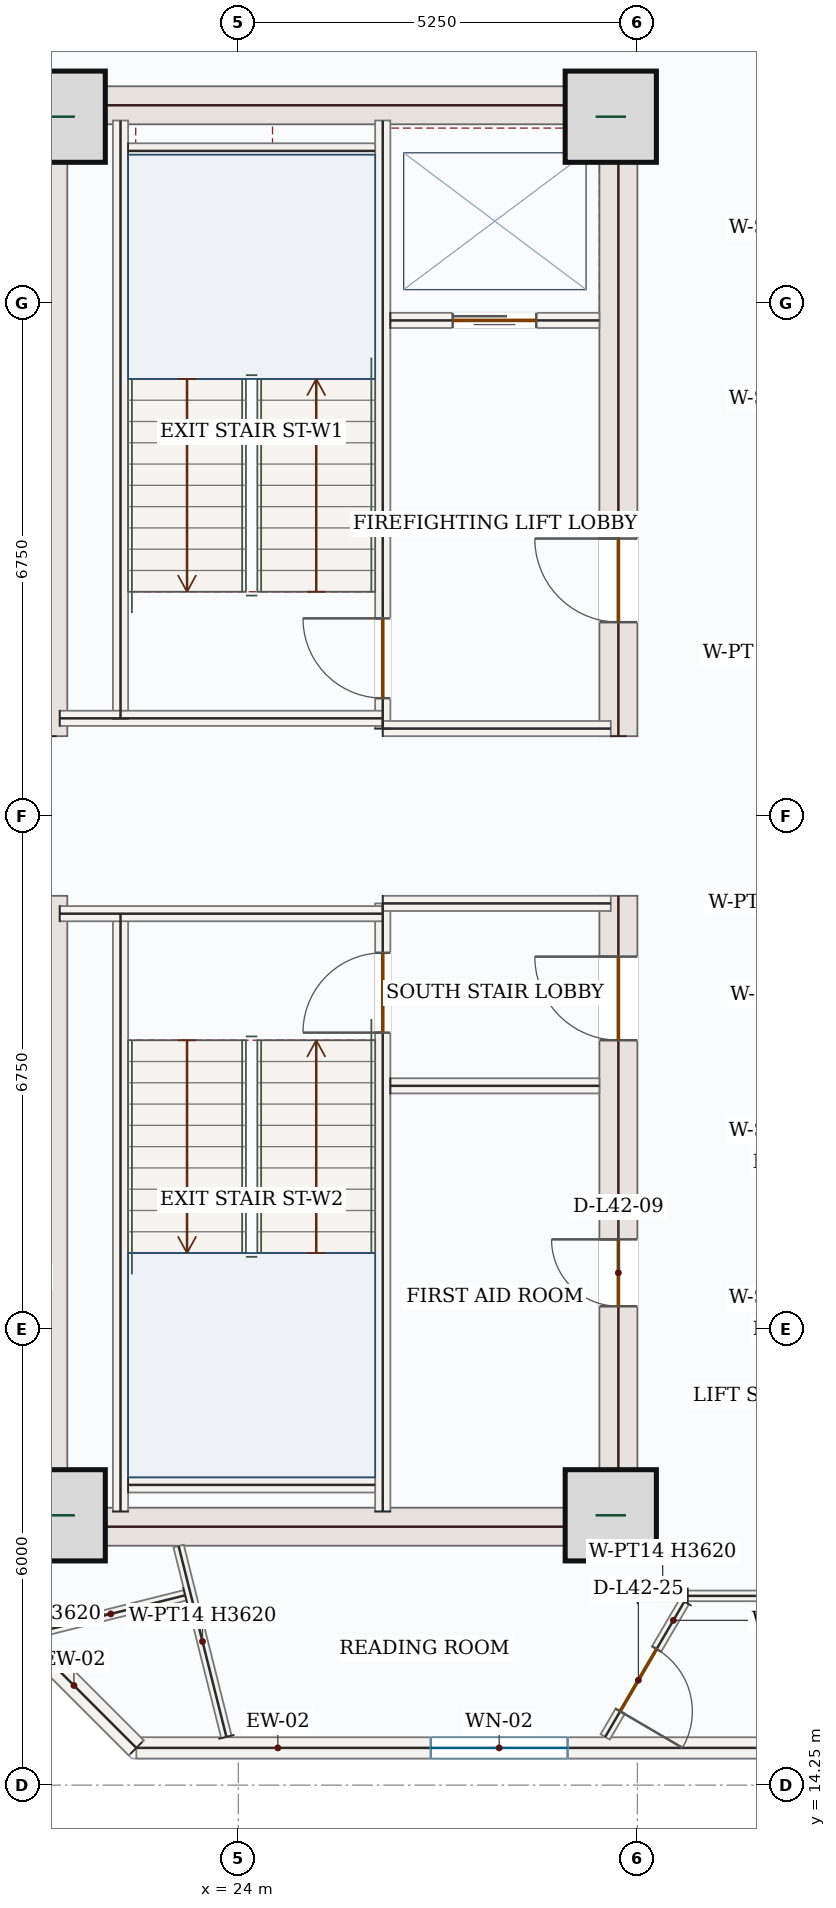
"""IFC4 building model, lengths in metres.
Left out: names, types, materials, properties, quantities, classifications, styles, units other than length and angle.
Written with IfcOpenShell. Run it as: python <this file> out.ifc"""

import sys

from ifc_helpers import new_model, si_unit, direction, frame, frame_2d, origin, origin_2d, place, context, subcontext, project, spatial, rectangle, extrude, source, transform, mapped, element, fill, save


model = new_model("IFC4")
c1 = context("Model", 3, precision=1e-05, world=origin(), true_north=direction((0.0, 1.0)))
c2 = subcontext(c1, "Body", "Model", "MODEL_VIEW")
j1 = project(units=[si_unit("LENGTHUNIT", "METRE"), si_unit("PLANEANGLEUNIT", "RADIAN")], contexts=[c1])
p1 = place(None, origin())
s1 = spatial("IfcSite", under=j1, at=p1, CompositionType="ELEMENT")
p2 = place(p1, origin())
s2 = spatial("IfcBuilding", under=s1, at=p2, CompositionType="ELEMENT")
p3 = place(p2, frame((0.0, 0.0, 182.4)))
s3 = spatial("IfcBuildingStorey", under=s2, at=p3, CompositionType="ELEMENT", Elevation=182.4)
m1 = source(origin(), c2, "Body", "SweptSolid", [
    extrude(rectangle(XDim=8.55, YDim=0.5, at=frame_2d((4.275, 0.0))), origin(), (0.0, 0.0, 1.0), 3.62),
])
for number, where, z_axis, x_axis in (
    (1, (21.5, 17.4, 0.0), (0.0, 0.0, 1.0), (0.0, 1.0, 0.0)),
    (2, (21.5, 28.05, 0.0), (0.0, 0.0, 1.0), (0.0, 1.0, 0.0)),
):
    element("IfcWall", number, at=place(p3, frame(where, z_axis=z_axis, x_axis=x_axis)), inside=s3, PredefinedType="SHEAR", context=c2, shape_type="MappedRepresentation", body=[
        mapped(m1, transform((0.0, 0.0, 0.0), x_axis=(1.0, 0.0, 0.0), y_axis=(0.0, 1.0, 0.0), z_axis=(0.0, 0.0, 1.0), scale=1.0)),
    ])
p4 = place(p3, frame((29.0, 17.4, 0.0), z_axis=(0.0, 0.0, 1.0), x_axis=(0.0, 1.0, 0.0)))
e3 = element("IfcWall", 3, at=p4, inside=s3, PredefinedType="SHEAR", context=c2, shape_type="SweptSolid", body=[
    extrude(rectangle(XDim=8.55, YDim=0.5, at=frame_2d((4.275, 0.0))), origin(), (0.0, 0.0, 1.0), 3.62),
])
p5 = place(p4, frame((6.65, 0.0, 0.0)))
e4 = element("IfcOpeningElement", 4, at=p5, cuts=e3, PredefinedType="OPENING", context=c2, shape_type="SweptSolid", body=[
    extrude(rectangle(XDim=1.1, YDim=2.2, at=frame_2d((0.55, 1.1))), frame((0.0, 0.26, 0.0), z_axis=(0.0, -1.0, 0.0), x_axis=(1.0, 0.0, 0.0)), (0.0, 0.0, 1.0), 0.52),
])
p6 = place(p4, frame((3.15, 0.0, 0.0)))
e5 = element("IfcOpeningElement", 5, at=p6, cuts=e3, PredefinedType="OPENING", context=c2, shape_type="SweptSolid", body=[
    extrude(rectangle(XDim=0.88, YDim=2.1, at=frame_2d((0.44, 1.05))), frame((0.0, 0.26, 0.0), z_axis=(0.0, -1.0, 0.0), x_axis=(1.0, 0.0, 0.0)), (0.0, 0.0, 1.0), 0.52),
])
p7 = place(p3, frame((29.0, 28.05, 0.0), z_axis=(0.0, 0.0, 1.0), x_axis=(0.0, 1.0, 0.0)))
e6 = element("IfcWall", 6, at=p7, inside=s3, PredefinedType="SHEAR", context=c2, shape_type="SweptSolid", body=[
    extrude(rectangle(XDim=8.55, YDim=0.5, at=frame_2d((4.275, 0.0))), origin(), (0.0, 0.0, 1.0), 3.62),
])
p8 = place(p7, frame((1.5, 0.0, 0.0)))
e7 = element("IfcOpeningElement", 7, at=p8, cuts=e6, PredefinedType="OPENING", context=c2, shape_type="SweptSolid", body=[
    extrude(rectangle(XDim=1.1, YDim=2.2, at=frame_2d((0.55, 1.1))), frame((0.0, 0.26, 0.0), z_axis=(0.0, -1.0, 0.0), x_axis=(1.0, 0.0, 0.0)), (0.0, 0.0, 1.0), 0.52),
])
m2 = source(origin(), c2, "Body", "SweptSolid", [
    extrude(rectangle(XDim=7.0, YDim=0.5, at=frame_2d((3.5, 0.0))), origin(), (0.0, 0.0, 1.0), 3.62),
])
for number, where, z_axis, x_axis in (
    (8, (21.75, 17.65, 0.0), (0.0, 0.0, 1.0), (1.0, 0.0, 0.0)),
    (9, (21.75, 36.35, 0.0), (0.0, 0.0, 1.0), (1.0, 0.0, 0.0)),
):
    element("IfcWall", number, at=place(p3, frame(where, z_axis=z_axis, x_axis=x_axis)), inside=s3, PredefinedType="SHEAR", context=c2, shape_type="MappedRepresentation", body=[
        mapped(m2, transform((0.0, 0.0, 0.0), x_axis=(1.0, 0.0, 0.0), y_axis=(0.0, 1.0, 0.0), z_axis=(0.0, 0.0, 1.0), scale=1.0)),
    ])
m3 = source(origin(), c2, "Body", "SweptSolid", [
    extrude(rectangle(XDim=1.2, YDim=1.2, at=origin_2d()), origin(), (0.0, 0.0, 1.0), 3.9),
])
for number, where, z_axis, x_axis in (
    (10, (21.65, 17.8, 0.0), (0.0, 0.0, 1.0), (1.0, 0.0, 0.0)),
    (11, (28.9, 17.8, 0.0), (0.0, 0.0, 1.0), (1.0, 0.0, 0.0)),
    (12, (21.65, 36.2, 0.0), (0.0, 0.0, 1.0), (1.0, 0.0, 0.0)),
    (13, (28.9, 36.2, 0.0), (0.0, 0.0, 1.0), (1.0, 0.0, 0.0)),
):
    element("IfcColumn", number, at=place(p3, frame(where, z_axis=z_axis, x_axis=x_axis)), inside=s3, PredefinedType="COLUMN", context=c2, shape_type="MappedRepresentation", body=[
        mapped(m3, transform((0.0, 0.0, 0.0), x_axis=(1.0, 0.0, 0.0), y_axis=(0.0, 1.0, 0.0), z_axis=(0.0, 0.0, 1.0), scale=1.0)),
    ])
p9 = place(p3, frame((32.205, 14.74, 0.0), z_axis=(0.0, 0.0, 1.0), x_axis=(-1.0, 0.0, 0.0)))
e14 = element("IfcWall", 14, at=p9, inside=s3, PredefinedType="SOLIDWALL", context=c2, shape_type="SweptSolid", body=[
    extrude(rectangle(XDim=9.547, YDim=0.28, at=frame_2d((4.773, 0.0))), origin(), (0.0, 0.0, 1.0), 3.62),
])
p10 = place(p9, frame((3.873, 0.0, 0.85)))
e15 = element("IfcOpeningElement", 15, at=p10, cuts=e14, PredefinedType="OPENING", context=c2, shape_type="SweptSolid", body=[
    extrude(rectangle(XDim=1.8, YDim=1.75, at=frame_2d((0.9, 0.875))), frame((0.0, 0.15, 0.0), z_axis=(0.0, -1.0, 0.0), x_axis=(1.0, 0.0, 0.0)), (0.0, 0.0, 1.0), 0.3),
])
m4 = source(origin(), c2, "Body", "SweptSolid", [
    extrude(rectangle(XDim=2.322, YDim=0.28, at=frame_2d((1.161, 0.0))), origin(), (0.0, 0.0, 1.0), 3.62),
])
p11 = place(p3, frame((22.658, 14.74, 0.0), z_axis=(0.0, 0.0, 1.0), x_axis=(-0.707106781187, 0.707106781187, 0.0)))
e16 = element("IfcWall", 16, at=p11, inside=s3, PredefinedType="SOLIDWALL", context=c2, shape_type="MappedRepresentation", body=[
    mapped(m4, transform((0.0, 0.0, 0.0), x_axis=(1.0, 0.0, 0.0), y_axis=(0.0, 1.0, 0.0), z_axis=(0.0, 0.0, 1.0), scale=1.0)),
])
m5 = source(origin(), c2, "Body", "SweptSolid", [
    extrude(rectangle(XDim=5.258, YDim=0.28, at=frame_2d((2.629, 0.0))), origin(), (0.0, 0.0, 1.0), 3.62),
])
p12 = place(p3, frame((18.94, 35.542, 0.0), z_axis=(0.0, 0.0, 1.0), x_axis=(0.707106781187, 0.707106781187, 0.0)))
e17 = element("IfcWall", 17, at=p12, inside=s3, PredefinedType="SOLIDWALL", context=c2, shape_type="MappedRepresentation", body=[
    mapped(m5, transform((0.0, 0.0, 0.0), x_axis=(1.0, 0.0, 0.0), y_axis=(0.0, 1.0, 0.0), z_axis=(0.0, 0.0, 1.0), scale=1.0)),
])
m6 = source(origin(), c2, "Body", "SweptSolid", [
    extrude(rectangle(XDim=7.87, YDim=0.2, at=frame_2d((3.935, 0.0))), origin(), (0.0, 0.0, 1.0), 3.62),
])
for number, where, z_axis, x_axis in (
    (18, (22.45, 17.85, 0.0), (0.0, 0.0, 1.0), (0.0, 1.0, 0.0)),
    (19, (22.45, 28.28, 0.0), (0.0, 0.0, 1.0), (0.0, 1.0, 0.0)),
):
    element("IfcWall", number, at=place(p3, frame(where, z_axis=z_axis, x_axis=x_axis)), inside=s3, PredefinedType="SOLIDWALL", context=c2, shape_type="MappedRepresentation", body=[
        mapped(m6, transform((0.0, 0.0, 0.0), x_axis=(1.0, 0.0, 0.0), y_axis=(0.0, 1.0, 0.0), z_axis=(0.0, 0.0, 1.0), scale=1.0)),
    ])
p13 = place(p3, frame((25.9, 17.85, 0.0), z_axis=(0.0, 0.0, 1.0), x_axis=(0.0, 1.0, 0.0)))
e20 = element("IfcWall", 20, at=p13, inside=s3, PredefinedType="SOLIDWALL", context=c2, shape_type="SweptSolid", body=[
    extrude(rectangle(XDim=8.0, YDim=0.2, at=frame_2d((4.0, 0.0))), origin(), (0.0, 0.0, 1.0), 3.62),
])
p14 = place(p13, frame((6.3, 0.0, 0.0)))
e21 = element("IfcOpeningElement", 21, at=p14, cuts=e20, PredefinedType="OPENING", context=c2, shape_type="SweptSolid", body=[
    extrude(rectangle(XDim=1.05, YDim=2.15, at=frame_2d((0.525, 1.075))), frame((0.0, 0.11, 0.0), z_axis=(0.0, -1.0, 0.0), x_axis=(1.0, 0.0, 0.0)), (0.0, 0.0, 1.0), 0.22),
])
p15 = place(p3, frame((25.9, 28.15, 0.0), z_axis=(0.0, 0.0, 1.0), x_axis=(0.0, 1.0, 0.0)))
e22 = element("IfcWall", 22, at=p15, inside=s3, PredefinedType="SOLIDWALL", context=c2, shape_type="SweptSolid", body=[
    extrude(rectangle(XDim=8.0, YDim=0.2, at=frame_2d((4.0, 0.0))), origin(), (0.0, 0.0, 1.0), 3.62),
])
p16 = place(p15, frame((0.4, 0.0, 0.0)))
e23 = element("IfcOpeningElement", 23, at=p16, cuts=e22, PredefinedType="OPENING", context=c2, shape_type="SweptSolid", body=[
    extrude(rectangle(XDim=1.05, YDim=2.15, at=frame_2d((0.525, 1.075))), frame((0.0, 0.11, 0.0), z_axis=(0.0, -1.0, 0.0), x_axis=(1.0, 0.0, 0.0)), (0.0, 0.0, 1.0), 0.22),
])
m7 = source(origin(), c2, "Body", "SweptSolid", [
    extrude(rectangle(XDim=4.25, YDim=0.2, at=frame_2d((2.125, 0.0))), origin(), (0.0, 0.0, 1.0), 3.62),
])
p17 = place(p3, frame((21.65, 25.715, 0.0), z_axis=(0.0, 0.0, 1.0), x_axis=(1.0, 0.0, 0.0)))
e24 = element("IfcWall", 24, at=p17, inside=s3, PredefinedType="SOLIDWALL", context=c2, shape_type="MappedRepresentation", body=[
    mapped(m7, transform((0.0, 0.0, 0.0), x_axis=(1.0, 0.0, 0.0), y_axis=(0.0, 1.0, 0.0), z_axis=(0.0, 0.0, 1.0), scale=1.0)),
])
m8 = source(origin(), c2, "Body", "SweptSolid", [
    extrude(rectangle(XDim=3.0, YDim=0.2, at=frame_2d((1.5, 0.0))), origin(), (0.0, 0.0, 1.0), 3.62),
])
p18 = place(p3, frame((25.9, 25.85, 0.0), z_axis=(0.0, 0.0, 1.0), x_axis=(1.0, 0.0, 0.0)))
e25 = element("IfcWall", 25, at=p18, inside=s3, PredefinedType="SOLIDWALL", context=c2, shape_type="MappedRepresentation", body=[
    mapped(m8, transform((0.0, 0.0, 0.0), x_axis=(1.0, 0.0, 0.0), y_axis=(0.0, 1.0, 0.0), z_axis=(0.0, 0.0, 1.0), scale=1.0)),
])
p19 = place(p3, frame((21.65, 28.285, 0.0), z_axis=(0.0, 0.0, 1.0), x_axis=(1.0, 0.0, 0.0)))
e26 = element("IfcWall", 26, at=p19, inside=s3, PredefinedType="SOLIDWALL", context=c2, shape_type="MappedRepresentation", body=[
    mapped(m7, transform((0.0, 0.0, 0.0), x_axis=(1.0, 0.0, 0.0), y_axis=(0.0, 1.0, 0.0), z_axis=(0.0, 0.0, 1.0), scale=1.0)),
])
p20 = place(p3, frame((25.9, 28.15, 0.0), z_axis=(0.0, 0.0, 1.0), x_axis=(1.0, 0.0, 0.0)))
e27 = element("IfcWall", 27, at=p20, inside=s3, PredefinedType="SOLIDWALL", context=c2, shape_type="MappedRepresentation", body=[
    mapped(m8, transform((0.0, 0.0, 0.0), x_axis=(1.0, 0.0, 0.0), y_axis=(0.0, 1.0, 0.0), z_axis=(0.0, 0.0, 1.0), scale=1.0)),
])
m9 = source(origin(), c2, "Body", "SweptSolid", [
    extrude(rectangle(XDim=3.25, YDim=0.2, at=frame_2d((1.625, 0.0))), origin(), (0.0, 0.0, 1.0), 3.62),
])
for number, where, z_axis, x_axis in (
    (28, (22.55, 35.75, 0.0), (0.0, 0.0, 1.0), (1.0, 0.0, 0.0)),
    (29, (22.55, 18.2, 0.0), (0.0, 0.0, 1.0), (1.0, 0.0, 0.0)),
):
    element("IfcWall", number, at=place(p3, frame(where, z_axis=z_axis, x_axis=x_axis)), inside=s3, PredefinedType="SOLIDWALL", context=c2, shape_type="MappedRepresentation", body=[
        mapped(m9, transform((0.0, 0.0, 0.0), x_axis=(1.0, 0.0, 0.0), y_axis=(0.0, 1.0, 0.0), z_axis=(0.0, 0.0, 1.0), scale=1.0)),
    ])
p21 = place(p3, frame((26.0, 33.52, 0.0), z_axis=(0.0, 0.0, 1.0), x_axis=(1.0, 0.0, 0.0)))
e30 = element("IfcWall", 30, at=p21, inside=s3, PredefinedType="SOLIDWALL", context=c2, shape_type="SweptSolid", body=[
    extrude(rectangle(XDim=2.75, YDim=0.2, at=frame_2d((1.375, 0.0))), origin(), (0.0, 0.0, 1.0), 3.62),
])
p22 = place(p21, frame((0.82, 0.0, 0.0)))
e31 = element("IfcOpeningElement", 31, at=p22, cuts=e30, PredefinedType="OPENING", context=c2, shape_type="SweptSolid", body=[
    extrude(rectangle(XDim=1.1, YDim=2.15, at=frame_2d((0.55, 1.075))), frame((0.0, 0.11, 0.0), z_axis=(0.0, -1.0, 0.0), x_axis=(1.0, 0.0, 0.0)), (0.0, 0.0, 1.0), 0.22),
])
m10 = source(origin(), c2, "Body", "SweptSolid", [
    extrude(rectangle(XDim=2.75, YDim=0.2, at=frame_2d((1.375, 0.0))), origin(), (0.0, 0.0, 1.0), 3.62),
])
p23 = place(p3, frame((26.0, 23.45, 0.0), z_axis=(0.0, 0.0, 1.0), x_axis=(1.0, 0.0, 0.0)))
e32 = element("IfcWall", 32, at=p23, inside=s3, PredefinedType="SOLIDWALL", context=c2, shape_type="MappedRepresentation", body=[
    mapped(m10, transform((0.0, 0.0, 0.0), x_axis=(1.0, 0.0, 0.0), y_axis=(0.0, 1.0, 0.0), z_axis=(0.0, 0.0, 1.0), scale=1.0)),
])
m11 = source(origin(), c2, "Body", "SweptSolid", [
    extrude(rectangle(XDim=0.659, YDim=0.14, at=frame_2d((0.329, 0.0))), origin(), (0.0, 0.0, 1.0), 3.62),
])
p24 = place(p3, frame((29.253, 16.74, 0.0), z_axis=(0.0, 0.0, 1.0), x_axis=(0.999999725245, -0.000741289641, 0.0)))
e33 = element("IfcWall", 33, at=p24, inside=s3, PredefinedType="PARTITIONING", context=c2, shape_type="MappedRepresentation", body=[
    mapped(m11, transform((0.0, 0.0, 0.0), x_axis=(1.0, 0.0, 0.0), y_axis=(0.0, 1.0, 0.0), z_axis=(0.0, 0.0, 1.0), scale=1.0)),
])
p25 = place(p3, frame((29.868, 16.665, 0.0), z_axis=(0.0, 0.0, 1.0), x_axis=(-0.505011455642, -0.863112640198, 0.0)))
e34 = element("IfcWall", 34, at=p25, inside=s3, PredefinedType="PARTITIONING", context=c2, shape_type="SweptSolid", body=[
    extrude(rectangle(XDim=2.062, YDim=0.14, at=frame_2d((1.031, 0.0))), origin(), (0.0, 0.0, 1.0), 3.62),
])
p26 = place(p25, frame((0.723, 0.0, 0.0)))
e35 = element("IfcOpeningElement", 35, at=p26, cuts=e34, PredefinedType="OPENING", context=c2, shape_type="SweptSolid", body=[
    extrude(rectangle(XDim=0.95, YDim=2.15, at=frame_2d((0.475, 1.075))), frame((0.0, 0.08, 0.0), z_axis=(0.0, -1.0, 0.0), x_axis=(1.0, 0.0, 0.0)), (0.0, 0.0, 1.0), 0.16),
])
m12 = source(origin(), c2, "Body", "SweptSolid", [
    extrude(rectangle(XDim=2.588, YDim=0.14, at=frame_2d((1.294, 0.0))), origin(), (0.0, 0.0, 1.0), 3.62),
])
p27 = place(p3, frame((23.843, 14.885, 0.0), z_axis=(0.0, 0.0, 1.0), x_axis=(-0.242957412811, 0.97003695577, 0.0)))
e36 = element("IfcWall", 36, at=p27, inside=s3, PredefinedType="PARTITIONING", context=c2, shape_type="MappedRepresentation", body=[
    mapped(m12, transform((0.0, 0.0, 0.0), x_axis=(1.0, 0.0, 0.0), y_axis=(0.0, 1.0, 0.0), z_axis=(0.0, 0.0, 1.0), scale=1.0)),
])
m13 = source(origin(), c2, "Body", "SweptSolid", [
    extrude(rectangle(XDim=2.014, YDim=0.14, at=frame_2d((1.007, 0.0))), origin(), (0.0, 0.0, 1.0), 3.62),
])
p28 = place(p3, frame((23.299, 16.747, 0.0), z_axis=(0.0, 0.0, 1.0), x_axis=(-0.970056889313, -0.242877811867, 0.0)))
e37 = element("IfcWall", 37, at=p28, inside=s3, PredefinedType="PARTITIONING", context=c2, shape_type="MappedRepresentation", body=[
    mapped(m13, transform((0.0, 0.0, 0.0), x_axis=(1.0, 0.0, 0.0), y_axis=(0.0, 1.0, 0.0), z_axis=(0.0, 0.0, 1.0), scale=1.0)),
])
p29 = place(p3, frame((29.912, 16.74, 0.0), z_axis=(0.0, 0.0, 1.0), x_axis=(1.0, 0.0, 0.0)))
e38 = element("IfcWall", 38, at=p29, inside=s3, PredefinedType="PARTITIONING", context=c2, shape_type="SweptSolid", body=[
    extrude(rectangle(XDim=7.806, YDim=0.14, at=frame_2d((3.903, 0.0))), origin(), (0.0, 0.0, 1.0), 3.62),
])
p30 = place(p29, frame((5.348, 0.0, 0.0)))
e39 = element("IfcOpeningElement", 39, at=p30, cuts=e38, PredefinedType="OPENING", context=c2, shape_type="SweptSolid", body=[
    extrude(rectangle(XDim=0.95, YDim=2.15, at=frame_2d((0.475, 1.075))), frame((0.0, 0.08, 0.0), z_axis=(0.0, -1.0, 0.0), x_axis=(1.0, 0.0, 0.0)), (0.0, 0.0, 1.0), 0.16),
])
m14 = source(origin(), c2, "Body", "SweptSolid", [
    extrude(rectangle(XDim=1.8, YDim=1.75, at=frame_2d((0.9, 0.875))), frame((0.0, 0.03, 0.0), z_axis=(0.0, -1.0, 0.0), x_axis=(1.0, 0.0, 0.0)), (0.0, 0.0, 1.0), 0.06),
])
p31 = place(p10, origin())
e40 = element("IfcWindow", 40, at=p31, inside=s3, PartitioningType="DOUBLE_PANEL_VERTICAL", PredefinedType="WINDOW", context=c2, shape_type="MappedRepresentation", body=[
    mapped(m14, transform((0.0, 0.0, 0.0), x_axis=(1.0, 0.0, 0.0), y_axis=(0.0, 1.0, 0.0), z_axis=(0.0, 0.0, 1.0), scale=1.0)),
])
fill(e15, e40)
m15 = source(origin(), c2, "Body", "SweptSolid", [
    extrude(rectangle(XDim=1.05, YDim=2.15, at=frame_2d((0.525, 1.075))), frame((0.0, 0.025, 0.0), z_axis=(0.0, -1.0, 0.0), x_axis=(1.0, 0.0, 0.0)), (0.0, 0.0, 1.0), 0.05),
])
p32 = place(p16, origin())
e41 = element("IfcDoor", 41, at=p32, inside=s3, OperationType="SINGLE_SWING_RIGHT", PredefinedType="DOOR", context=c2, shape_type="MappedRepresentation", body=[
    mapped(m15, transform((0.0, 0.0, 0.0), x_axis=(1.0, 0.0, 0.0), y_axis=(0.0, 1.0, 0.0), z_axis=(0.0, 0.0, 1.0), scale=1.0)),
])
fill(e23, e41)
p33 = place(p14, origin())
e42 = element("IfcDoor", 42, at=p33, inside=s3, OperationType="SINGLE_SWING_LEFT", PredefinedType="DOOR", context=c2, shape_type="MappedRepresentation", body=[
    mapped(m15, transform((0.0, 0.0, 0.0), x_axis=(1.0, 0.0, 0.0), y_axis=(0.0, 1.0, 0.0), z_axis=(0.0, 0.0, 1.0), scale=1.0)),
])
fill(e21, e42)
m16 = source(origin(), c2, "Body", "SweptSolid", [
    extrude(rectangle(XDim=1.1, YDim=2.15, at=frame_2d((0.55, 1.075))), frame((0.0, 0.025, 0.0), z_axis=(0.0, -1.0, 0.0), x_axis=(1.0, 0.0, 0.0)), (0.0, 0.0, 1.0), 0.05),
])
p34 = place(p22, origin())
e43 = element("IfcDoor", 43, at=p34, inside=s3, OperationType="DOUBLE_DOOR_SLIDING", PredefinedType="DOOR", context=c2, shape_type="MappedRepresentation", body=[
    mapped(m16, transform((0.0, 0.0, 0.0), x_axis=(1.0, 0.0, 0.0), y_axis=(0.0, 1.0, 0.0), z_axis=(0.0, 0.0, 1.0), scale=1.0)),
])
fill(e31, e43)
m17 = source(origin(), c2, "Body", "SweptSolid", [
    extrude(rectangle(XDim=1.1, YDim=2.2, at=frame_2d((0.55, 1.1))), frame((0.0, 0.025, 0.0), z_axis=(0.0, -1.0, 0.0), x_axis=(1.0, 0.0, 0.0)), (0.0, 0.0, 1.0), 0.05),
])
p35 = place(p8, origin())
e44 = element("IfcDoor", 44, at=p35, inside=s3, OperationType="SINGLE_SWING_RIGHT", PredefinedType="DOOR", context=c2, shape_type="MappedRepresentation", body=[
    mapped(m17, transform((0.0, 0.0, 0.0), x_axis=(1.0, 0.0, 0.0), y_axis=(0.0, 1.0, 0.0), z_axis=(0.0, 0.0, 1.0), scale=1.0)),
])
fill(e7, e44)
p36 = place(p5, origin())
e45 = element("IfcDoor", 45, at=p36, inside=s3, OperationType="SINGLE_SWING_RIGHT", PredefinedType="DOOR", context=c2, shape_type="MappedRepresentation", body=[
    mapped(m17, transform((0.0, 0.0, 0.0), x_axis=(1.0, 0.0, 0.0), y_axis=(0.0, 1.0, 0.0), z_axis=(0.0, 0.0, 1.0), scale=1.0)),
])
fill(e4, e45)
m18 = source(origin(), c2, "Body", "SweptSolid", [
    extrude(rectangle(XDim=0.88, YDim=2.1, at=frame_2d((0.44, 1.05))), frame((0.0, 0.025, 0.0), z_axis=(0.0, -1.0, 0.0), x_axis=(1.0, 0.0, 0.0)), (0.0, 0.0, 1.0), 0.05),
])
p37 = place(p6, origin())
e46 = element("IfcDoor", 46, at=p37, inside=s3, OperationType="SINGLE_SWING_RIGHT", PredefinedType="DOOR", context=c2, shape_type="MappedRepresentation", body=[
    mapped(m18, transform((0.0, 0.0, 0.0), x_axis=(1.0, 0.0, 0.0), y_axis=(0.0, 1.0, 0.0), z_axis=(0.0, 0.0, 1.0), scale=1.0)),
])
fill(e5, e46)
m19 = source(origin(), c2, "Body", "SweptSolid", [
    extrude(rectangle(XDim=0.95, YDim=2.15, at=frame_2d((0.475, 1.075))), frame((0.0, 0.025, 0.0), z_axis=(0.0, -1.0, 0.0), x_axis=(1.0, 0.0, 0.0)), (0.0, 0.0, 1.0), 0.05),
])
p38 = place(p26, origin())
e47 = element("IfcDoor", 47, at=p38, inside=s3, OperationType="SINGLE_SWING_RIGHT", PredefinedType="DOOR", context=c2, shape_type="MappedRepresentation", body=[
    mapped(m19, transform((0.0, 0.0, 0.0), x_axis=(1.0, 0.0, 0.0), y_axis=(0.0, 1.0, 0.0), z_axis=(0.0, 0.0, 1.0), scale=1.0)),
])
fill(e35, e47)
save(model, sys.argv[1])
